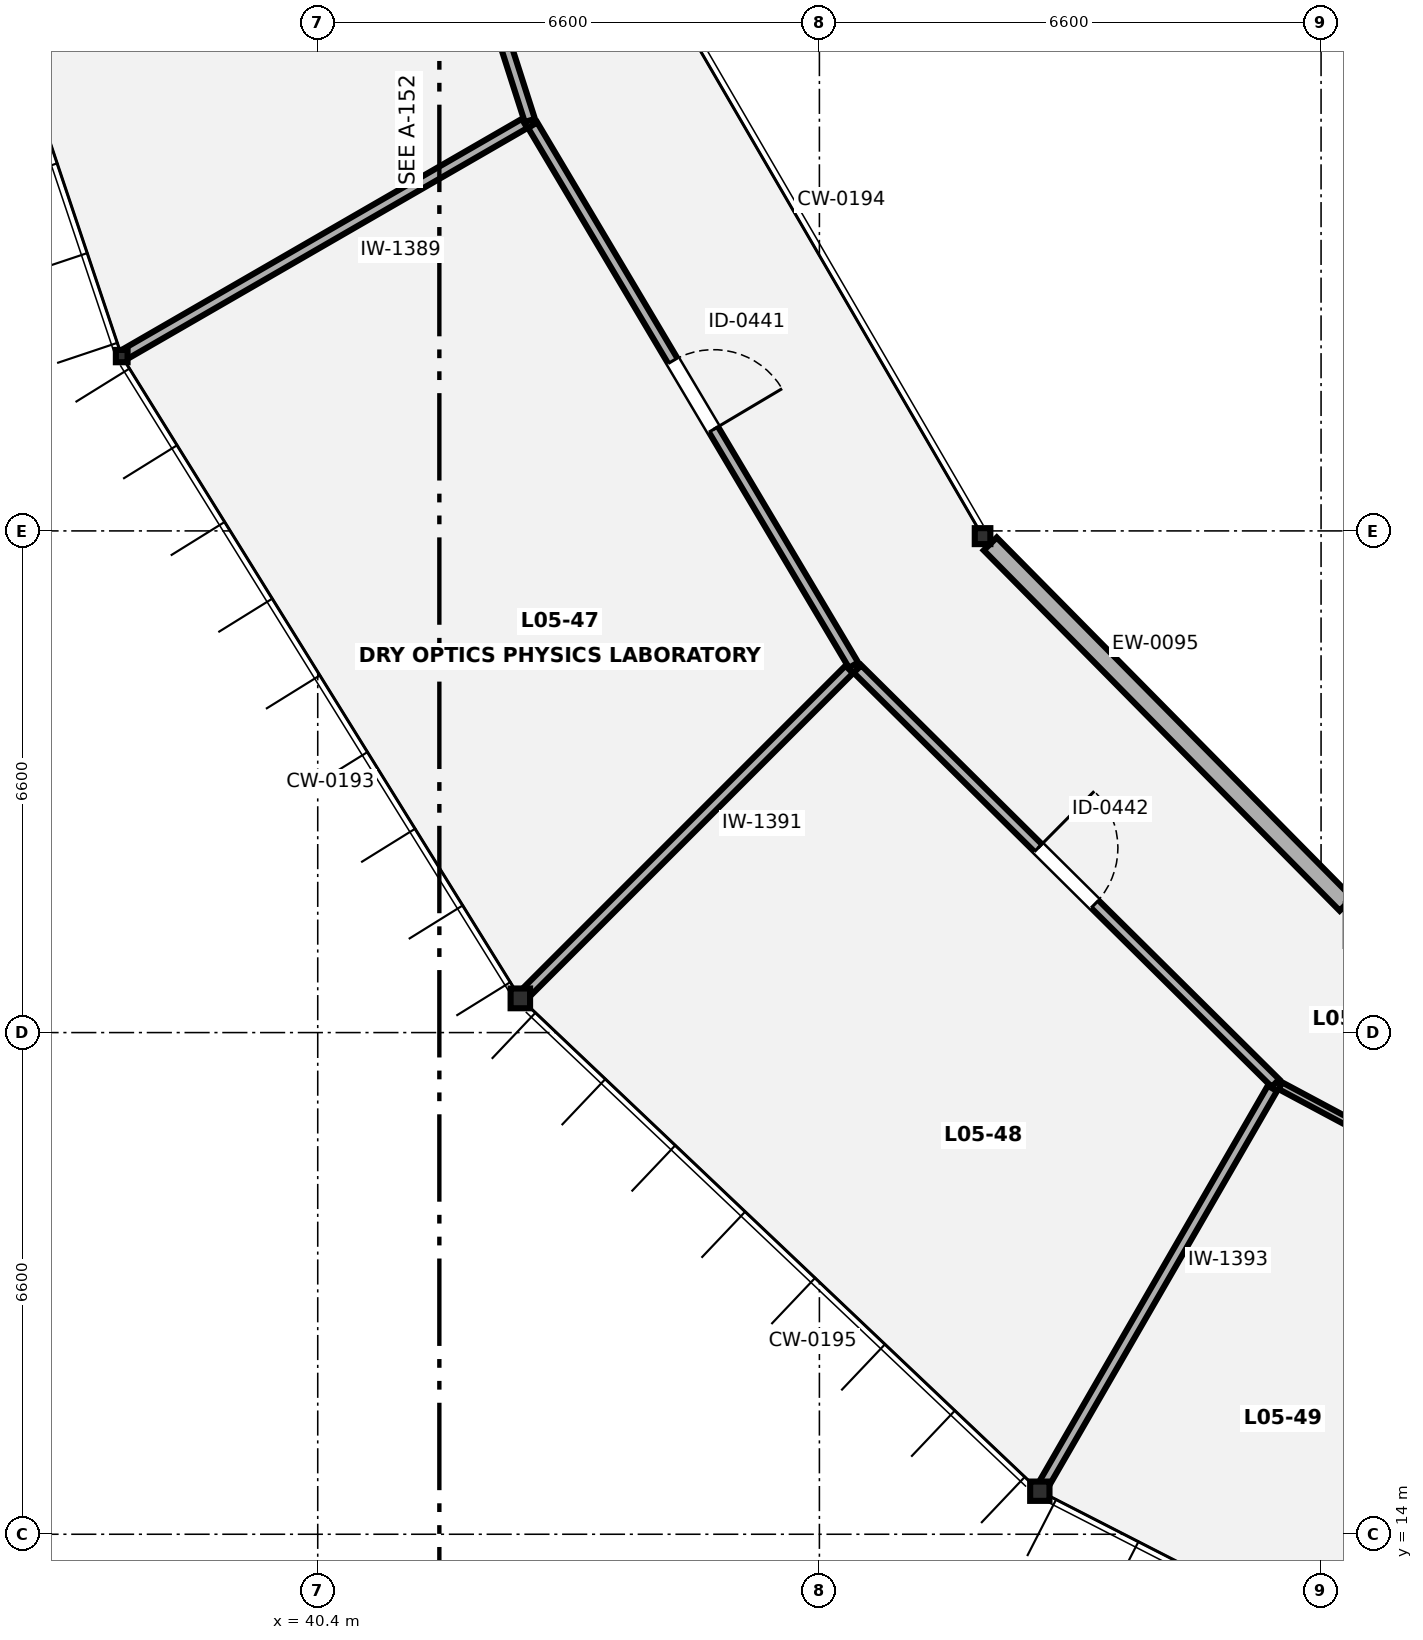
"""IFC4 building model, lengths in metres.
Left out: names, types, materials, properties, quantities, classifications, styles, units other than length and angle.
Written with IfcOpenShell. Run it as: python <this file> out.ifc"""

import sys

from ifc_helpers import new_model, si_unit, direction, frame, frame_2d, origin, origin_2d, place, context, subcontext, project, spatial, rectangle, i_section, extrude, element, fill, save


model = new_model("IFC4")
c1 = context("Model", 3, precision=1e-05, world=origin(), true_north=direction((0.0, 1.0)))
c2 = subcontext(c1, "Body", "Model", "MODEL_VIEW")
j1 = project(units=[si_unit("LENGTHUNIT", "METRE"), si_unit("PLANEANGLEUNIT", "RADIAN")], contexts=[c1])
p1 = place(None, origin())
s1 = spatial("IfcSite", under=j1, at=p1, CompositionType="ELEMENT")
p2 = place(p1, origin())
s2 = spatial("IfcBuilding", under=s1, at=p2, CompositionType="ELEMENT")
p3 = place(p2, frame((0.0, 0.0, 21.7)))
s3 = spatial("IfcBuildingStorey", under=s2, at=p3, CompositionType="ELEMENT", Elevation=21.7)
p4 = place(p3, frame((37.821, 29.5, 0.0), z_axis=(0.0, 0.0, 1.0), x_axis=(1.0, 0.0, 0.0)))
e1 = element("IfcColumn", 1, at=p4, inside=s3, PredefinedType="COLUMN", context=c2, shape_type="SweptSolid", body=[
    extrude(i_section(OverallWidth=0.154, OverallDepth=0.162, WebThickness=0.008, FlangeThickness=0.011, FilletRadius=0.009, at=origin_2d()), origin(), (0.0, 0.0, 1.0), 4.2),
])
p5 = place(p3, frame((43.065, 21.05, 0.0), z_axis=(0.0, 0.0, 1.0), x_axis=(1.0, 0.0, 0.0)))
e2 = element("IfcColumn", 2, at=p5, inside=s3, PredefinedType="COLUMN", context=c2, shape_type="SweptSolid", body=[
    extrude(i_section(OverallWidth=0.256, OverallDepth=0.26, WebThickness=0.01, FlangeThickness=0.017, FilletRadius=0.014, at=origin_2d()), origin(), (0.0, 0.0, 1.0), 4.2),
])
p6 = place(p3, frame((49.146, 27.131, 0.0), z_axis=(0.0, 0.0, 1.0), x_axis=(1.0, 0.0, 0.0)))
e3 = element("IfcColumn", 3, at=p6, inside=s3, PredefinedType="COLUMN", context=c2, shape_type="SweptSolid", body=[
    extrude(i_section(OverallWidth=0.205, OverallDepth=0.21, WebThickness=0.009, FlangeThickness=0.014, FilletRadius=0.011, at=origin_2d()), origin(), (0.0, 0.0, 1.0), 4.2),
])
p7 = place(p3, frame((49.9, 14.566, 0.0), z_axis=(0.0, 0.0, 1.0), x_axis=(1.0, 0.0, 0.0)))
e4 = element("IfcColumn", 4, at=p7, inside=s3, PredefinedType="COLUMN", context=c2, shape_type="SweptSolid", body=[
    extrude(i_section(OverallWidth=0.254, OverallDepth=0.254, WebThickness=0.009, FlangeThickness=0.014, FilletRadius=0.014, at=origin_2d()), origin(), (0.0, 0.0, 1.0), 4.2),
])
p8 = place(p3, frame((49.248, 27.029, 0.0), z_axis=(0.0, 0.0, 1.0), x_axis=(0.702641034555, -0.711544500759, 0.0)))
e5 = element("IfcWall", 5, at=p8, inside=s3, PredefinedType="SOLIDWALL", context=c2, shape_type="SweptSolid", body=[
    extrude(rectangle(XDim=6.663, YDim=0.24, at=frame_2d((3.332, 0.0))), origin(), (0.0, 0.0, 1.0), 3.6),
])
p9 = place(p3, frame((40.513, 40.945, 0.0), z_axis=(0.0, 0.0, 1.0), x_axis=(0.305493323507, -0.952194218263, 0.0)))
e6 = element("IfcWall", 6, at=p9, inside=s3, PredefinedType="PARTITIONING", context=c2, shape_type="SweptSolid", body=[
    extrude(rectangle(XDim=8.764, YDim=0.14, at=frame_2d((4.382, 0.0))), origin(), (0.0, 0.0, 1.0), 3.98),
])
p10 = place(p9, frame((3.857, 0.0, 0.0)))
e7 = element("IfcOpeningElement", 7, at=p10, cuts=e6, PredefinedType="OPENING", context=c2, shape_type="SweptSolid", body=[
    extrude(rectangle(XDim=1.05, YDim=2.15, at=frame_2d((0.525, 1.075))), frame((0.0, 0.08, 0.0), z_axis=(0.0, -1.0, 0.0), x_axis=(1.0, 0.0, 0.0)), (0.0, 0.0, 1.0), 0.16),
])
p11 = place(p3, frame((43.121, 32.56, 0.0), z_axis=(0.0, 0.0, 1.0), x_axis=(-0.866010470582, -0.500025864173, 0.0)))
e8 = element("IfcWall", 8, at=p11, inside=s3, PredefinedType="PARTITIONING", context=c2, shape_type="SweptSolid", body=[
    extrude(rectangle(XDim=6.06, YDim=0.14, at=frame_2d((3.03, 0.0))), origin(), (0.0, 0.0, 1.0), 3.522),
])
p12 = place(p3, frame((43.227, 32.538, 0.0), z_axis=(0.0, 0.0, 1.0), x_axis=(0.510911392115, -0.859633380812, 0.0)))
e9 = element("IfcWall", 9, at=p12, inside=s3, PredefinedType="PARTITIONING", context=c2, shape_type="SweptSolid", body=[
    extrude(rectangle(XDim=8.264, YDim=0.14, at=frame_2d((4.132, 0.0))), origin(), (0.0, 0.0, 1.0), 3.98),
])
p13 = place(p12, frame((3.607, 0.0, 0.0)))
e10 = element("IfcOpeningElement", 10, at=p13, cuts=e9, PredefinedType="OPENING", context=c2, shape_type="SweptSolid", body=[
    extrude(rectangle(XDim=1.05, YDim=2.15, at=frame_2d((0.525, 1.075))), frame((0.0, 0.08, 0.0), z_axis=(0.0, -1.0, 0.0), x_axis=(1.0, 0.0, 0.0)), (0.0, 0.0, 1.0), 0.16),
])
p14 = place(p3, frame((47.393, 25.377, 0.0), z_axis=(0.0, 0.0, 1.0), x_axis=(-0.707086637129, -0.70712692467, 0.0)))
e11 = element("IfcWall", 11, at=p14, inside=s3, PredefinedType="PARTITIONING", context=c2, shape_type="SweptSolid", body=[
    extrude(rectangle(XDim=6.06, YDim=0.14, at=frame_2d((3.03, 0.0))), origin(), (0.0, 0.0, 1.0), 3.522),
])
p15 = place(p3, frame((47.501, 25.383, 0.0), z_axis=(0.0, 0.0, 1.0), x_axis=(0.71042636545, -0.703771539119, 0.0)))
e12 = element("IfcWall", 12, at=p15, inside=s3, PredefinedType="PARTITIONING", context=c2, shape_type="SweptSolid", body=[
    extrude(rectangle(XDim=7.741, YDim=0.14, at=frame_2d((3.87, 0.0))), origin(), (0.0, 0.0, 1.0), 3.98),
])
p16 = place(p15, frame((3.345, 0.0, 0.0)))
e13 = element("IfcOpeningElement", 13, at=p16, cuts=e12, PredefinedType="OPENING", context=c2, shape_type="SweptSolid", body=[
    extrude(rectangle(XDim=1.05, YDim=2.15, at=frame_2d((0.525, 1.075))), frame((0.0, 0.08, 0.0), z_axis=(0.0, -1.0, 0.0), x_axis=(1.0, 0.0, 0.0)), (0.0, 0.0, 1.0), 0.16),
])
p17 = place(p3, frame((52.96, 19.866, 0.0), z_axis=(0.0, 0.0, 1.0), x_axis=(-0.500008418462, -0.866020543329, 0.0)))
e14 = element("IfcWall", 14, at=p17, inside=s3, PredefinedType="PARTITIONING", context=c2, shape_type="SweptSolid", body=[
    extrude(rectangle(XDim=6.06, YDim=0.14, at=frame_2d((3.03, 0.0))), origin(), (0.0, 0.0, 1.0), 3.313),
])
p18 = place(p3, frame((53.063, 19.902, 0.0), z_axis=(0.0, 0.0, 1.0), x_axis=(0.881826283139, -0.471574391125, 0.0)))
e15 = element("IfcWall", 15, at=p18, inside=s3, PredefinedType="PARTITIONING", context=c2, shape_type="SweptSolid", body=[
    extrude(rectangle(XDim=7.258, YDim=0.1, at=frame_2d((3.629, 0.0))), origin(), (0.0, 0.0, 1.0), 3.98),
])
p19 = place(p18, frame((3.129, 0.0, 0.0)))
e16 = element("IfcOpeningElement", 16, at=p19, cuts=e15, PredefinedType="OPENING", context=c2, shape_type="SweptSolid", body=[
    extrude(rectangle(XDim=1.0, YDim=2.1, at=frame_2d((0.5, 1.05))), frame((0.0, 0.06, 0.0), z_axis=(0.0, -1.0, 0.0), x_axis=(1.0, 0.0, 0.0)), (0.0, 0.0, 1.0), 0.12),
])
p20 = place(p13, origin())
e17 = element("IfcDoor", 17, at=p20, inside=s3, OperationType="SINGLE_SWING_RIGHT", PredefinedType="DOOR", context=c2, shape_type="SweptSolid", body=[
    extrude(rectangle(XDim=1.05, YDim=2.15, at=frame_2d((0.525, 1.075))), frame((0.0, 0.025, 0.0), z_axis=(0.0, -1.0, 0.0), x_axis=(1.0, 0.0, 0.0)), (0.0, 0.0, 1.0), 0.05),
])
fill(e10, e17)
p21 = place(p16, origin())
e18 = element("IfcDoor", 18, at=p21, inside=s3, OperationType="SINGLE_SWING_LEFT", PredefinedType="DOOR", context=c2, shape_type="SweptSolid", body=[
    extrude(rectangle(XDim=1.05, YDim=2.15, at=frame_2d((0.525, 1.075))), frame((0.0, 0.025, 0.0), z_axis=(0.0, -1.0, 0.0), x_axis=(1.0, 0.0, 0.0)), (0.0, 0.0, 1.0), 0.05),
])
fill(e13, e18)
save(model, sys.argv[1])
